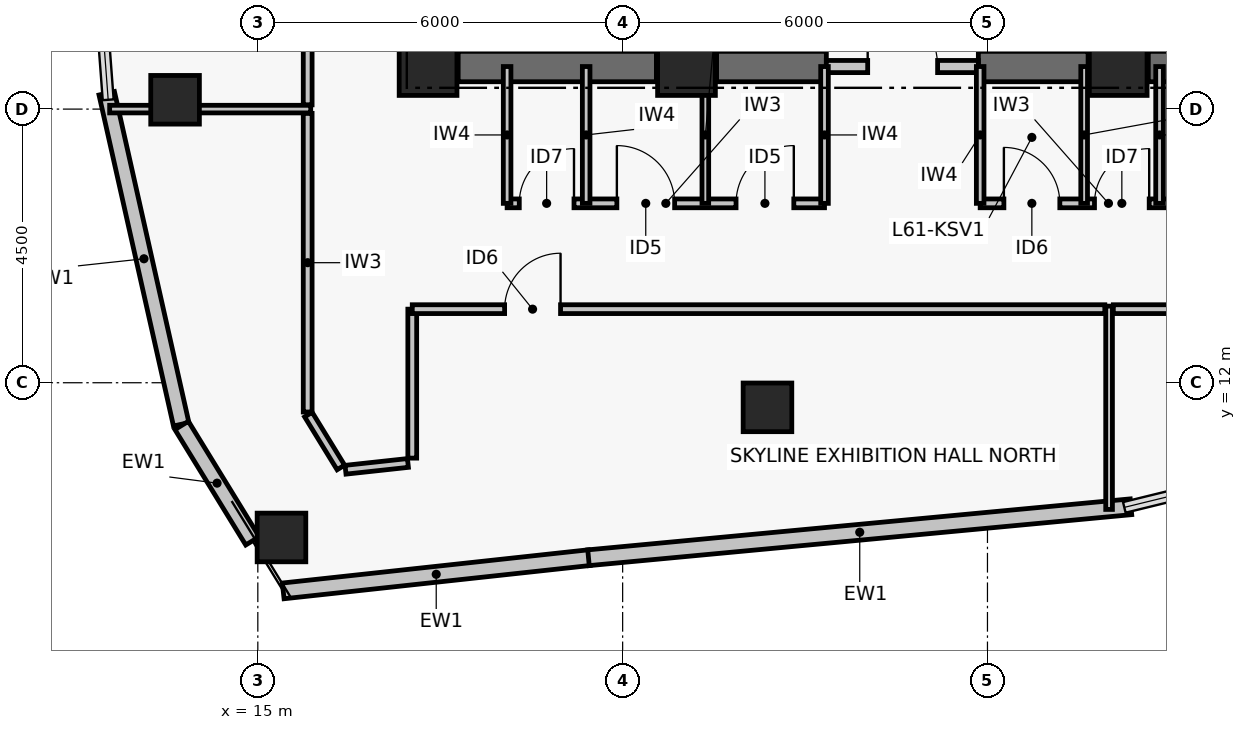
"""IFC4 building model, lengths in metres.
Left out: names, types, materials, properties, quantities, classifications, styles, units other than length and angle.
Written with IfcOpenShell. Run it as: python <this file> out.ifc"""

import sys

from ifc_helpers import new_model, si_unit, direction, frame, frame_2d, origin, origin_2d, place, context, subcontext, project, spatial, rectangle, hollow_rectangle, extrude, element, fill, save


model = new_model("IFC4")
c1 = context("Model", 3, precision=1e-05, world=origin(), true_north=direction((0.0, 1.0)))
c2 = subcontext(c1, "Body", "Model", "MODEL_VIEW")
j1 = project(units=[si_unit("LENGTHUNIT", "METRE"), si_unit("PLANEANGLEUNIT", "RADIAN")], contexts=[c1])
p1 = place(None, origin())
s1 = spatial("IfcSite", under=j1, at=p1, CompositionType="ELEMENT")
p2 = place(p1, origin())
s2 = spatial("IfcBuilding", under=s1, at=p2, CompositionType="ELEMENT")
p3 = place(p2, frame((0.0, 0.0, 242.64)))
s3 = spatial("IfcBuildingStorey", under=s2, at=p3, CompositionType="ELEMENT", Elevation=242.64)
for number, where, z_axis, x_axis in (
    (1, (17.8, 17.2, 0.0), (0.0, 0.0, 1.0), (1.0, 0.0, 0.0)),
    (2, (22.05, 17.2, 0.0), (0.0, 0.0, 1.0), (1.0, 0.0, 0.0)),
    (3, (29.15, 17.2, 0.0), (0.0, 0.0, 1.0), (1.0, 0.0, 0.0)),
):
    element("IfcColumn", number, at=place(p3, frame(where, z_axis=z_axis, x_axis=x_axis)), inside=s3, PredefinedType="COLUMN", context=c2, shape_type="SweptSolid", body=[
        extrude(rectangle(XDim=0.95, YDim=0.95, at=origin_2d()), origin(), (0.0, 0.0, 1.0), 4.5),
    ])
p4 = place(p3, frame((18.295, 17.2, 0.0), z_axis=(0.0, 0.0, 1.0), x_axis=(1.0, 0.0, 0.0)))
e4 = element("IfcWall", 4, at=p4, inside=s3, PredefinedType="SHEAR", context=c2, shape_type="SweptSolid", body=[
    extrude(rectangle(XDim=3.26, YDim=0.5, at=frame_2d((1.63, 0.0))), origin(), (0.0, 0.0, 1.0), 4.28),
])
p5 = place(p3, frame((22.545, 17.2, 0.0), z_axis=(0.0, 0.0, 1.0), x_axis=(1.0, 0.0, 0.0)))
e5 = element("IfcWall", 5, at=p5, inside=s3, PredefinedType="SHEAR", context=c2, shape_type="SweptSolid", body=[
    extrude(rectangle(XDim=1.805, YDim=0.5, at=frame_2d((0.903, 0.0))), origin(), (0.0, 0.0, 1.0), 4.28),
])
p6 = place(p3, frame((26.85, 17.2, 0.0), z_axis=(0.0, 0.0, 1.0), x_axis=(1.0, 0.0, 0.0)))
e6 = element("IfcWall", 6, at=p6, inside=s3, PredefinedType="SHEAR", context=c2, shape_type="SweptSolid", body=[
    extrude(rectangle(XDim=1.805, YDim=0.5, at=frame_2d((0.902, 0.0))), origin(), (0.0, 0.0, 1.0), 4.28),
])
p7 = place(p3, frame((29.645, 17.2, 0.0), z_axis=(0.0, 0.0, 1.0), x_axis=(1.0, 0.0, 0.0)))
e7 = element("IfcWall", 7, at=p7, inside=s3, PredefinedType="SHEAR", context=c2, shape_type="SweptSolid", body=[
    extrude(rectangle(XDim=3.26, YDim=0.5, at=frame_2d((1.63, 0.0))), origin(), (0.0, 0.0, 1.0), 4.28),
])
for number, where, z_axis, x_axis in (
    (8, (13.639, 16.653, 0.0), (0.0, 0.0, 1.0), (1.0, 0.0, 0.0)),
    (9, (15.389, 9.455, 0.0), (0.0, 0.0, 1.0), (1.0, 0.0, 0.0)),
    (10, (23.382, 11.595, 0.0), (0.0, 0.0, 1.0), (1.0, 0.0, 0.0)),
):
    element("IfcColumn", number, at=place(p3, frame(where, z_axis=z_axis, x_axis=x_axis)), inside=s3, PredefinedType="COLUMN", context=c2, shape_type="SweptSolid", body=[
        extrude(hollow_rectangle(XDim=0.8, YDim=0.8, WallThickness=0.035, at=origin_2d()), origin(), (0.0, 0.0, 1.0), 4.5),
    ])
p8 = place(p3, frame((13.74, 11.317, 0.0), z_axis=(0.0, 0.0, 1.0), x_axis=(-0.219510112872, 0.975610224601, 0.0)))
e11 = element("IfcWall", 11, at=p8, inside=s3, PredefinedType="PARTITIONING", context=c2, shape_type="SweptSolid", body=[
    extrude(rectangle(XDim=5.58, YDim=0.26, at=frame_2d((2.79, 0.0))), origin(), (0.0, 0.0, 1.0), 4.28),
])
p9 = place(p3, frame((14.912, 9.4, 0.0), z_axis=(0.0, 0.0, 1.0), x_axis=(-0.52314291314, 0.852244972077, 0.0)))
e12 = element("IfcWall", 12, at=p9, inside=s3, PredefinedType="PARTITIONING", context=c2, shape_type="SweptSolid", body=[
    extrude(rectangle(XDim=2.227, YDim=0.26, at=frame_2d((1.114, 0.0))), origin(), (0.0, 0.0, 1.0), 4.28),
])
p10 = place(p3, frame((20.45, 9.123, 0.0), z_axis=(0.0, 0.0, 1.0), x_axis=(-0.994158757437, -0.107927591518, 0.0)))
e13 = element("IfcWall", 13, at=p10, inside=s3, PredefinedType="PARTITIONING", context=c2, shape_type="SweptSolid", body=[
    extrude(rectangle(XDim=5.062, YDim=0.26, at=frame_2d((2.531, 0.0))), origin(), (0.0, 0.0, 1.0), 4.28),
])
p11 = place(p3, frame((29.36, 9.96, 0.0), z_axis=(0.0, 0.0, 1.0), x_axis=(-0.995616246459, -0.093532292754, 0.0)))
e14 = element("IfcWall", 14, at=p11, inside=s3, PredefinedType="PARTITIONING", context=c2, shape_type="SweptSolid", body=[
    extrude(rectangle(XDim=8.961, YDim=0.26, at=frame_2d((4.48, 0.0))), origin(), (0.0, 0.0, 1.0), 4.28),
])
p12 = place(p3, frame((24.35, 17.2, 0.0), z_axis=(0.0, 0.0, 1.0), x_axis=(1.0, 0.0, 0.0)))
e15 = element("IfcWall", 15, at=p12, inside=s3, PredefinedType="PARTITIONING", context=c2, shape_type="SweptSolid", body=[
    extrude(rectangle(XDim=2.5, YDim=0.2, at=frame_2d((1.25, 0.0))), origin(), (0.0, 0.0, 1.0), 3.41),
])
p13 = place(p12, frame((0.68, 0.0, 0.0)))
e16 = element("IfcOpeningElement", 16, at=p13, cuts=e15, PredefinedType="OPENING", context=c2, shape_type="SweptSolid", body=[
    extrude(rectangle(XDim=1.15, YDim=2.08, at=frame_2d((0.575, 1.04))), frame((0.0, 0.11, 0.0), z_axis=(0.0, -1.0, 0.0), x_axis=(1.0, 0.0, 0.0)), (0.0, 0.0, 1.0), 0.22),
])
p14 = place(p3, frame((19.1, 14.95, 0.0), z_axis=(0.0, 0.0, 1.0), x_axis=(1.0, 0.0, 0.0)))
e17 = element("IfcWall", 17, at=p14, inside=s3, PredefinedType="PARTITIONING", context=c2, shape_type="SweptSolid", body=[
    extrude(rectangle(XDim=5.22, YDim=0.145, at=frame_2d((2.61, 0.0))), origin(), (0.0, 0.0, 1.0), 3.56),
])
p15 = place(p14, frame((0.2, 0.0, 0.0)))
e18 = element("IfcOpeningElement", 18, at=p15, cuts=e17, PredefinedType="OPENING", context=c2, shape_type="SweptSolid", body=[
    extrude(rectangle(XDim=0.9, YDim=2.02, at=frame_2d((0.45, 1.01))), frame((0.0, 0.083, 0.0), z_axis=(0.0, -1.0, 0.0), x_axis=(1.0, 0.0, 0.0)), (0.0, 0.0, 1.0), 0.165),
])
p16 = place(p14, frame((1.805, 0.0, 0.0)))
e19 = element("IfcOpeningElement", 19, at=p16, cuts=e17, PredefinedType="OPENING", context=c2, shape_type="SweptSolid", body=[
    extrude(rectangle(XDim=0.95, YDim=2.06, at=frame_2d((0.475, 1.03))), frame((0.0, 0.083, 0.0), z_axis=(0.0, -1.0, 0.0), x_axis=(1.0, 0.0, 0.0)), (0.0, 0.0, 1.0), 0.165),
])
p17 = place(p14, frame((3.765, 0.0, 0.0)))
e20 = element("IfcOpeningElement", 20, at=p17, cuts=e17, PredefinedType="OPENING", context=c2, shape_type="SweptSolid", body=[
    extrude(rectangle(XDim=0.95, YDim=2.06, at=frame_2d((0.475, 1.03))), frame((0.0, 0.083, 0.0), z_axis=(0.0, -1.0, 0.0), x_axis=(1.0, 0.0, 0.0)), (0.0, 0.0, 1.0), 0.165),
])
p18 = place(p3, frame((26.88, 14.95, 0.0), z_axis=(0.0, 0.0, 1.0), x_axis=(1.0, 0.0, 0.0)))
e21 = element("IfcWall", 21, at=p18, inside=s3, PredefinedType="PARTITIONING", context=c2, shape_type="SweptSolid", body=[
    extrude(rectangle(XDim=4.22, YDim=0.145, at=frame_2d((2.11, 0.0))), origin(), (0.0, 0.0, 1.0), 3.76),
])
p19 = place(p18, frame((0.39, 0.0, 0.0)))
e22 = element("IfcOpeningElement", 22, at=p19, cuts=e21, PredefinedType="OPENING", context=c2, shape_type="SweptSolid", body=[
    extrude(rectangle(XDim=0.92, YDim=2.05, at=frame_2d((0.46, 1.025))), frame((0.0, 0.083, 0.0), z_axis=(0.0, -1.0, 0.0), x_axis=(1.0, 0.0, 0.0)), (0.0, 0.0, 1.0), 0.165),
])
p20 = place(p18, frame((1.88, 0.0, 0.0)))
e23 = element("IfcOpeningElement", 23, at=p20, cuts=e21, PredefinedType="OPENING", context=c2, shape_type="SweptSolid", body=[
    extrude(rectangle(XDim=0.9, YDim=2.02, at=frame_2d((0.45, 1.01))), frame((0.0, 0.083, 0.0), z_axis=(0.0, -1.0, 0.0), x_axis=(1.0, 0.0, 0.0)), (0.0, 0.0, 1.0), 0.165),
])
p21 = place(p18, frame((3.14, 0.0, 0.0)))
e24 = element("IfcOpeningElement", 24, at=p21, cuts=e21, PredefinedType="OPENING", context=c2, shape_type="SweptSolid", body=[
    extrude(rectangle(XDim=0.9, YDim=2.02, at=frame_2d((0.45, 1.01))), frame((0.0, 0.083, 0.0), z_axis=(0.0, -1.0, 0.0), x_axis=(1.0, 0.0, 0.0)), (0.0, 0.0, 1.0), 0.165),
])
for number, where, z_axis, x_axis in (
    (25, (19.1, 14.95, 0.0), (0.0, 0.0, 1.0), (0.0, 1.0, 0.0)),
    (26, (20.4, 14.95, 0.0), (0.0, 0.0, 1.0), (0.0, 1.0, 0.0)),
):
    element("IfcWall", number, at=place(p3, frame(where, z_axis=z_axis, x_axis=x_axis)), inside=s3, PredefinedType="PARTITIONING", context=c2, shape_type="SweptSolid", body=[
        extrude(rectangle(XDim=2.25, YDim=0.125, at=frame_2d((1.125, 0.0))), origin(), (0.0, 0.0, 1.0), 3.41),
    ])
p22 = place(p3, frame((22.36, 14.95, 0.0), z_axis=(0.0, 0.0, 1.0), x_axis=(0.0, 1.0, 0.0)))
e27 = element("IfcWall", 27, at=p22, inside=s3, PredefinedType="PARTITIONING", context=c2, shape_type="SweptSolid", body=[
    extrude(rectangle(XDim=2.25, YDim=0.11, at=frame_2d((1.125, 0.0))), origin(), (0.0, 0.0, 1.0), 3.41),
])
for number, where, z_axis, x_axis in (
    (28, (24.32, 14.95, 0.0), (0.0, 0.0, 1.0), (0.0, 1.0, 0.0)),
    (29, (26.88, 14.95, 0.0), (0.0, 0.0, 1.0), (0.0, 1.0, 0.0)),
):
    element("IfcWall", number, at=place(p3, frame(where, z_axis=z_axis, x_axis=x_axis)), inside=s3, PredefinedType="PARTITIONING", context=c2, shape_type="SweptSolid", body=[
        extrude(rectangle(XDim=2.25, YDim=0.125, at=frame_2d((1.125, 0.0))), origin(), (0.0, 0.0, 1.0), 3.41),
    ])
p23 = place(p3, frame((28.59, 14.95, 0.0), z_axis=(0.0, 0.0, 1.0), x_axis=(0.0, 1.0, 0.0)))
e30 = element("IfcWall", 30, at=p23, inside=s3, PredefinedType="PARTITIONING", context=c2, shape_type="SweptSolid", body=[
    extrude(rectangle(XDim=2.25, YDim=0.11, at=frame_2d((1.125, 0.0))), origin(), (0.0, 0.0, 1.0), 3.41),
])
p24 = place(p3, frame((29.83, 14.95, 0.0), z_axis=(0.0, 0.0, 1.0), x_axis=(0.0, 1.0, 0.0)))
e31 = element("IfcWall", 31, at=p24, inside=s3, PredefinedType="PARTITIONING", context=c2, shape_type="SweptSolid", body=[
    extrude(rectangle(XDim=2.25, YDim=0.125, at=frame_2d((1.125, 0.0))), origin(), (0.0, 0.0, 1.0), 3.41),
])
p25 = place(p3, frame((15.82, 16.43, 0.0), z_axis=(0.0, 0.0, 1.0), x_axis=(0.0, -1.0, 0.0)))
e32 = element("IfcWall", 32, at=p25, inside=s3, PredefinedType="PARTITIONING", context=c2, shape_type="SweptSolid", body=[
    extrude(rectangle(XDim=4.911, YDim=0.145, at=frame_2d((2.456, 0.0))), origin(), (0.0, 0.0, 1.0), 3.56),
])
p26 = place(p3, frame((15.832, 11.477, 0.0), z_axis=(0.0, 0.0, 1.0), x_axis=(0.523122844464, -0.852257290729, 0.0)))
e33 = element("IfcWall", 33, at=p26, inside=s3, PredefinedType="PARTITIONING", context=c2, shape_type="SweptSolid", body=[
    extrude(rectangle(XDim=1.021, YDim=0.145, at=frame_2d((0.51, 0.0))), origin(), (0.0, 0.0, 1.0), 3.56),
])
p27 = place(p3, frame((16.442, 10.569, 0.0), z_axis=(0.0, 0.0, 1.0), x_axis=(0.994140595739, 0.108094754283, 0.0)))
e34 = element("IfcWall", 34, at=p27, inside=s3, PredefinedType="PARTITIONING", context=c2, shape_type="SweptSolid", body=[
    extrude(rectangle(XDim=1.032, YDim=0.145, at=frame_2d((0.516, 0.0))), origin(), (0.0, 0.0, 1.0), 4.28),
])
p28 = place(p3, frame((17.54, 10.76, 0.0), z_axis=(0.0, 0.0, 1.0), x_axis=(0.0, 1.0, 0.0)))
e35 = element("IfcWall", 35, at=p28, inside=s3, PredefinedType="PARTITIONING", context=c2, shape_type="SweptSolid", body=[
    extrude(rectangle(XDim=2.45, YDim=0.145, at=frame_2d((1.225, 0.0))), origin(), (0.0, 0.0, 1.0), 3.91),
])
p29 = place(p3, frame((17.54, 13.21, 0.0), z_axis=(0.0, 0.0, 1.0), x_axis=(1.0, 0.0, 0.0)))
e36 = element("IfcWall", 36, at=p29, inside=s3, PredefinedType="PARTITIONING", context=c2, shape_type="SweptSolid", body=[
    extrude(rectangle(XDim=11.39, YDim=0.145, at=frame_2d((5.695, 0.0))), origin(), (0.0, 0.0, 1.0), 3.56),
])
p30 = place(p29, frame((1.519, 0.0, 0.0)))
e37 = element("IfcOpeningElement", 37, at=p30, cuts=e36, PredefinedType="OPENING", context=c2, shape_type="SweptSolid", body=[
    extrude(rectangle(XDim=0.92, YDim=2.05, at=frame_2d((0.46, 1.025))), frame((0.0, 0.083, 0.0), z_axis=(0.0, -1.0, 0.0), x_axis=(1.0, 0.0, 0.0)), (0.0, 0.0, 1.0), 0.165),
])
p31 = place(p3, frame((29.07, 13.21, 0.0), z_axis=(0.0, 0.0, 1.0), x_axis=(1.0, 0.0, 0.0)))
e38 = element("IfcWall", 38, at=p31, inside=s3, PredefinedType="PARTITIONING", context=c2, shape_type="SweptSolid", body=[
    extrude(rectangle(XDim=2.23, YDim=0.145, at=frame_2d((1.115, 0.0))), origin(), (0.0, 0.0, 1.0), 4.28),
])
p32 = place(p3, frame((15.82, 27.43, 0.0), z_axis=(0.0, 0.0, 1.0), x_axis=(0.0, -1.0, 0.0)))
e39 = element("IfcWall", 39, at=p32, inside=s3, PredefinedType="PARTITIONING", context=c2, shape_type="SweptSolid", body=[
    extrude(rectangle(XDim=10.86, YDim=0.145, at=frame_2d((5.43, 0.0))), origin(), (0.0, 0.0, 1.0), 3.56),
])
p33 = place(p32, frame((4.955, 0.0, 0.0)))
e40 = element("IfcOpeningElement", 40, at=p33, cuts=e39, PredefinedType="OPENING", context=c2, shape_type="SweptSolid", body=[
    extrude(rectangle(XDim=0.95, YDim=2.06, at=frame_2d((0.475, 1.03))), frame((0.0, 0.083, 0.0), z_axis=(0.0, -1.0, 0.0), x_axis=(1.0, 0.0, 0.0)), (0.0, 0.0, 1.0), 0.165),
])
p34 = place(p3, frame((29.0, 9.917, 0.0), z_axis=(0.0, 0.0, 1.0), x_axis=(0.0, 1.0, 0.0)))
e41 = element("IfcWall", 41, at=p34, inside=s3, PredefinedType="PARTITIONING", context=c2, shape_type="SweptSolid", body=[
    extrude(rectangle(XDim=3.344, YDim=0.11, at=frame_2d((1.672, 0.0))), origin(), (0.0, 0.0, 1.0), 4.28),
])
p35 = place(p3, frame((12.563, 16.5, 0.0), z_axis=(0.0, 0.0, 1.0), x_axis=(1.0, 0.0, 0.0)))
e42 = element("IfcWall", 42, at=p35, inside=s3, PredefinedType="PARTITIONING", context=c2, shape_type="SweptSolid", body=[
    extrude(rectangle(XDim=3.307, YDim=0.125, at=frame_2d((1.653, 0.0))), origin(), (0.0, 0.0, 1.0), 3.56),
])
p36 = place(p13, origin())
e43 = element("IfcDoor", 43, at=p36, inside=s3, OperationType="SINGLE_SWING_LEFT", PredefinedType="DOOR", context=c2, shape_type="SweptSolid", body=[
    extrude(rectangle(XDim=1.15, YDim=2.08, at=frame_2d((0.575, 1.04))), frame((0.0, 0.025, 0.0), z_axis=(0.0, -1.0, 0.0), x_axis=(1.0, 0.0, 0.0)), (0.0, 0.0, 1.0), 0.05),
])
fill(e16, e43)
p37 = place(p15, origin())
e44 = element("IfcDoor", 44, at=p37, inside=s3, OperationType="SINGLE_SWING_RIGHT", PredefinedType="DOOR", context=c2, shape_type="SweptSolid", body=[
    extrude(rectangle(XDim=0.9, YDim=2.02, at=frame_2d((0.45, 1.01))), frame((0.0, 0.025, 0.0), z_axis=(0.0, -1.0, 0.0), x_axis=(1.0, 0.0, 0.0)), (0.0, 0.0, 1.0), 0.05),
])
fill(e18, e44)
p38 = place(p16, origin())
e45 = element("IfcDoor", 45, at=p38, inside=s3, OperationType="SINGLE_SWING_LEFT", PredefinedType="DOOR", context=c2, shape_type="SweptSolid", body=[
    extrude(rectangle(XDim=0.95, YDim=2.06, at=frame_2d((0.475, 1.03))), frame((0.0, 0.025, 0.0), z_axis=(0.0, -1.0, 0.0), x_axis=(1.0, 0.0, 0.0)), (0.0, 0.0, 1.0), 0.05),
])
fill(e19, e45)
p39 = place(p17, origin())
e46 = element("IfcDoor", 46, at=p39, inside=s3, OperationType="SINGLE_SWING_RIGHT", PredefinedType="DOOR", context=c2, shape_type="SweptSolid", body=[
    extrude(rectangle(XDim=0.95, YDim=2.06, at=frame_2d((0.475, 1.03))), frame((0.0, 0.025, 0.0), z_axis=(0.0, -1.0, 0.0), x_axis=(1.0, 0.0, 0.0)), (0.0, 0.0, 1.0), 0.05),
])
fill(e20, e46)
p40 = place(p19, origin())
e47 = element("IfcDoor", 47, at=p40, inside=s3, OperationType="SINGLE_SWING_LEFT", PredefinedType="DOOR", context=c2, shape_type="SweptSolid", body=[
    extrude(rectangle(XDim=0.92, YDim=2.05, at=frame_2d((0.46, 1.025))), frame((0.0, 0.025, 0.0), z_axis=(0.0, -1.0, 0.0), x_axis=(1.0, 0.0, 0.0)), (0.0, 0.0, 1.0), 0.05),
])
fill(e22, e47)
p41 = place(p20, origin())
e48 = element("IfcDoor", 48, at=p41, inside=s3, OperationType="SINGLE_SWING_RIGHT", PredefinedType="DOOR", context=c2, shape_type="SweptSolid", body=[
    extrude(rectangle(XDim=0.9, YDim=2.02, at=frame_2d((0.45, 1.01))), frame((0.0, 0.025, 0.0), z_axis=(0.0, -1.0, 0.0), x_axis=(1.0, 0.0, 0.0)), (0.0, 0.0, 1.0), 0.05),
])
fill(e23, e48)
p42 = place(p30, origin())
e49 = element("IfcDoor", 49, at=p42, inside=s3, OperationType="SINGLE_SWING_RIGHT", PredefinedType="DOOR", context=c2, shape_type="SweptSolid", body=[
    extrude(rectangle(XDim=0.92, YDim=2.05, at=frame_2d((0.46, 1.025))), frame((0.0, 0.025, 0.0), z_axis=(0.0, -1.0, 0.0), x_axis=(1.0, 0.0, 0.0)), (0.0, 0.0, 1.0), 0.05),
])
fill(e37, e49)
save(model, sys.argv[1])
